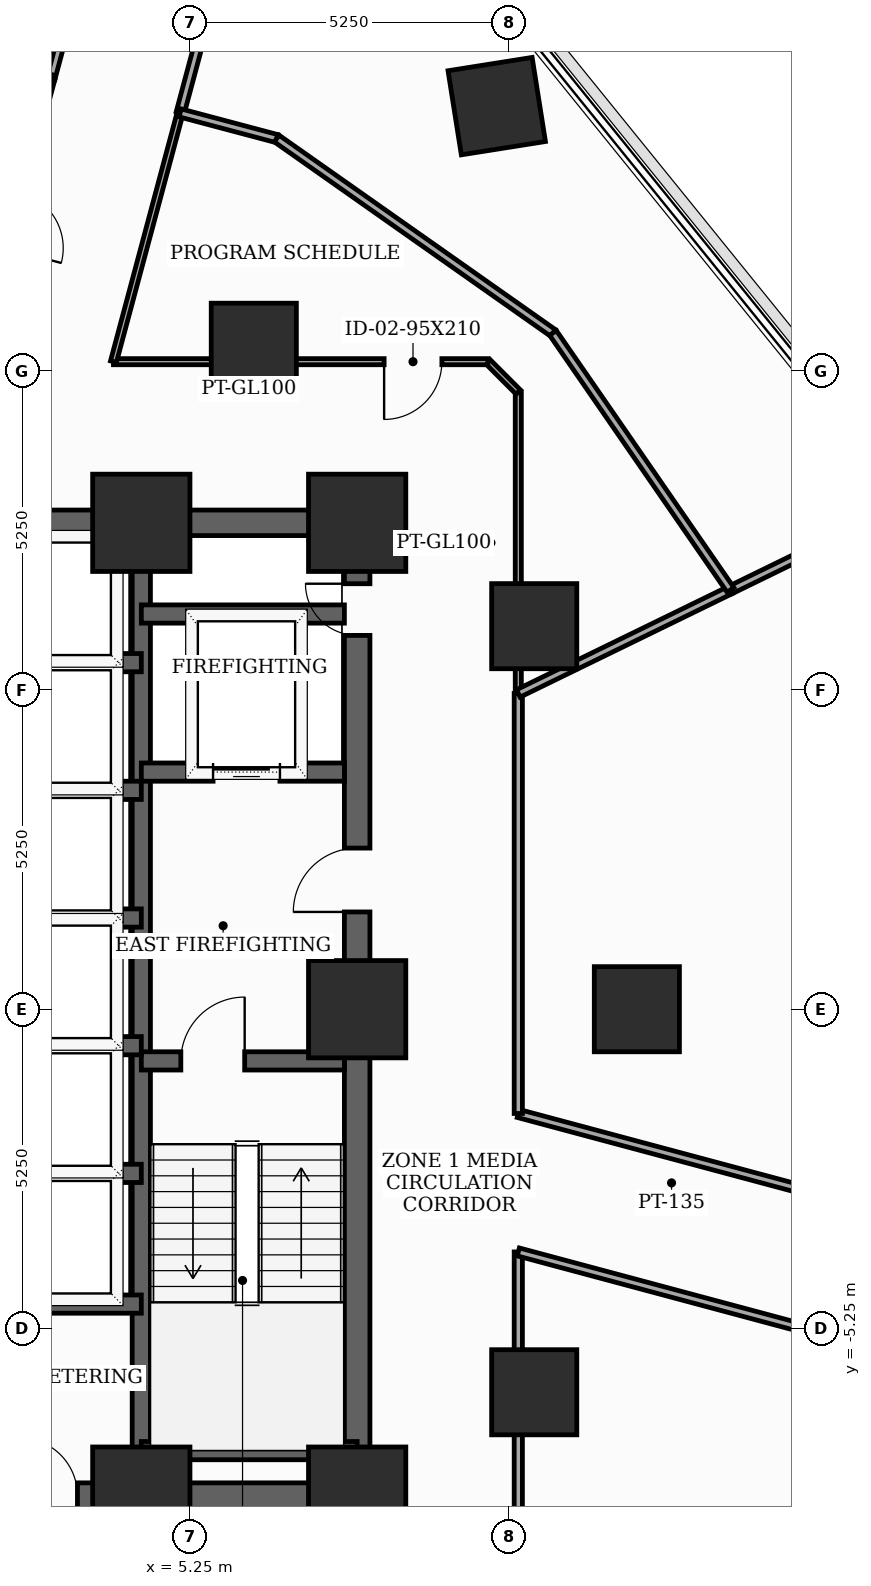
"""IFC4 building model, lengths in metres.
Left out: names, types, materials, properties, quantities, classifications, styles, units other than length and angle.
Written with IfcOpenShell. Run it as: python <this file> out.ifc"""

import sys

from ifc_helpers import new_model, si_unit, direction, frame, frame_2d, origin, origin_2d, place, context, subcontext, project, spatial, rectangle, extrude, element, fill, save


model = new_model("IFC4")
c1 = context("Model", 3, precision=1e-05, world=origin(), true_north=direction((0.0, 1.0)))
c2 = subcontext(c1, "Body", "Model", "MODEL_VIEW")
j1 = project(units=[si_unit("LENGTHUNIT", "METRE"), si_unit("PLANEANGLEUNIT", "RADIAN")], contexts=[c1])
p1 = place(None, origin())
s1 = spatial("IfcSite", under=j1, at=p1, CompositionType="ELEMENT")
p2 = place(p1, origin())
s2 = spatial("IfcBuilding", under=s1, at=p2, CompositionType="ELEMENT")
p3 = place(p2, frame((0.0, 0.0, 70.4)))
s3 = spatial("IfcBuildingStorey", under=s2, at=p3, CompositionType="ELEMENT", Elevation=70.4)
for number, where, z_axis, x_axis in (
    (1, (4.45, -8.0, 0.0), (0.0, 0.0, 1.0), (1.0, 0.0, 0.0)),
    (2, (8.0, -8.0, 0.0), (0.0, 0.0, 1.0), (1.0, 0.0, 0.0)),
    (3, (8.0, 0.0, 0.0), (0.0, 0.0, 1.0), (1.0, 0.0, 0.0)),
    (4, (8.0, 8.0, 0.0), (0.0, 0.0, 1.0), (1.0, 0.0, 0.0)),
    (5, (4.45, 8.0, 0.0), (0.0, 0.0, 1.0), (1.0, 0.0, 0.0)),
):
    element("IfcColumn", number, at=place(p3, frame(where, z_axis=z_axis, x_axis=x_axis)), inside=s3, PredefinedType="COLUMN", context=c2, shape_type="SweptSolid", body=[
        extrude(rectangle(XDim=1.6, YDim=1.6, at=origin_2d()), origin(), (0.0, 0.0, 1.0), 3.7),
    ])
for number, where, z_axis, x_axis in (
    (6, (12.6, 0.0, 0.0), (0.0, 0.0, 1.0), (1.0, 0.0, 0.0)),
    (7, (10.912, 6.3, 0.0), (0.0, 0.0, 1.0), (1.0, 0.0, 0.0)),
    (8, (6.3, 10.912, 0.0), (0.0, 0.0, 1.0), (1.0, 0.0, 0.0)),
    (9, (10.912, -6.3, 0.0), (0.0, 0.0, 1.0), (1.0, 0.0, 0.0)),
    (10, (10.295, 14.853, 0.0), (0.0, 0.0, 1.0), (0.988, 0.156, 0.0)),
):
    element("IfcColumn", number, at=place(p3, frame(where, z_axis=z_axis, x_axis=x_axis)), inside=s3, PredefinedType="COLUMN", context=c2, shape_type="SweptSolid", body=[
        extrude(rectangle(XDim=1.4, YDim=1.4, at=origin_2d()), origin(), (0.0, 0.0, 1.0), 3.7),
    ])
p4 = place(p3, frame((8.0, -8.0, 0.0), z_axis=(0.0, 0.0, 1.0), x_axis=(0.0, 1.0, 0.0)))
e11 = element("IfcWall", 11, at=p4, inside=s3, PredefinedType="SHEAR", context=c2, shape_type="SweptSolid", body=[
    extrude(rectangle(XDim=16.0, YDim=0.42, at=frame_2d((8.0, 0.0))), origin(), (0.0, 0.0, 1.0), 3.5),
])
p5 = place(p4, frame((9.6, 0.0, 0.0)))
e12 = element("IfcOpeningElement", 12, at=p5, cuts=e11, PredefinedType="OPENING", context=c2, shape_type="SweptSolid", body=[
    extrude(rectangle(XDim=1.05, YDim=2.15, at=frame_2d((0.525, 1.075))), frame((0.0, 0.22, 0.0), z_axis=(0.0, -1.0, 0.0), x_axis=(1.0, 0.0, 0.0)), (0.0, 0.0, 1.0), 0.44),
])
p6 = place(p4, frame((14.148, 0.0, 0.0)))
e13 = element("IfcOpeningElement", 13, at=p6, cuts=e11, PredefinedType="OPENING", context=c2, shape_type="SweptSolid", body=[
    extrude(rectangle(XDim=0.85, YDim=2.02, at=frame_2d((0.425, 1.01))), frame((0.0, 0.22, 0.0), z_axis=(0.0, -1.0, 0.0), x_axis=(1.0, 0.0, 0.0)), (0.0, 0.0, 1.0), 0.44),
])
p7 = place(p3, frame((-8.0, -8.0, 0.0), z_axis=(0.0, 0.0, 1.0), x_axis=(1.0, 0.0, 0.0)))
e14 = element("IfcWall", 14, at=p7, inside=s3, PredefinedType="SHEAR", context=c2, shape_type="SweptSolid", body=[
    extrude(rectangle(XDim=16.0, YDim=0.42, at=frame_2d((8.0, 0.0))), origin(), (0.0, 0.0, 1.0), 3.5),
])
p8 = place(p7, frame((4.6, 0.0, 0.0)))
e15 = element("IfcOpeningElement", 15, at=p8, cuts=e14, PredefinedType="OPENING", context=c2, shape_type="SweptSolid", body=[
    extrude(rectangle(XDim=0.95, YDim=2.1, at=frame_2d((0.475, 1.05))), frame((0.0, 0.22, 0.0), z_axis=(0.0, -1.0, 0.0), x_axis=(1.0, 0.0, 0.0)), (0.0, 0.0, 1.0), 0.44),
])
p9 = place(p7, frame((7.52, 0.0, 0.0)))
e16 = element("IfcOpeningElement", 16, at=p9, cuts=e14, PredefinedType="OPENING", context=c2, shape_type="SweptSolid", body=[
    extrude(rectangle(XDim=0.95, YDim=2.1, at=frame_2d((0.475, 1.05))), frame((0.0, 0.22, 0.0), z_axis=(0.0, -1.0, 0.0), x_axis=(1.0, 0.0, 0.0)), (0.0, 0.0, 1.0), 0.44),
])
p10 = place(p7, frame((10.45, 0.0, 0.0)))
e17 = element("IfcOpeningElement", 17, at=p10, cuts=e14, PredefinedType="OPENING", context=c2, shape_type="SweptSolid", body=[
    extrude(rectangle(XDim=0.95, YDim=2.1, at=frame_2d((0.475, 1.05))), frame((0.0, 0.22, 0.0), z_axis=(0.0, -1.0, 0.0), x_axis=(1.0, 0.0, 0.0)), (0.0, 0.0, 1.0), 0.44),
])
p11 = place(p3, frame((-8.0, 8.0, 0.0), z_axis=(0.0, 0.0, 1.0), x_axis=(1.0, 0.0, 0.0)))
e18 = element("IfcWall", 18, at=p11, inside=s3, PredefinedType="SHEAR", context=c2, shape_type="SweptSolid", body=[
    extrude(rectangle(XDim=16.0, YDim=0.42, at=frame_2d((8.0, 0.0))), origin(), (0.0, 0.0, 1.0), 3.5),
])
p12 = place(p11, frame((7.1, 0.0, 0.0)))
e19 = element("IfcOpeningElement", 19, at=p12, cuts=e18, PredefinedType="OPENING", context=c2, shape_type="SweptSolid", body=[
    extrude(rectangle(XDim=1.8, YDim=2.15, at=frame_2d((0.9, 1.075))), frame((0.0, 0.22, 0.0), z_axis=(0.0, -1.0, 0.0), x_axis=(1.0, 0.0, 0.0)), (0.0, 0.0, 1.0), 0.44),
])
p13 = place(p3, frame((4.45, -7.79, 0.0), z_axis=(0.0, 0.0, 1.0), x_axis=(0.0, 1.0, 0.0)))
e20 = element("IfcWall", 20, at=p13, inside=s3, PredefinedType="SHEAR", context=c2, shape_type="SweptSolid", body=[
    extrude(rectangle(XDim=15.58, YDim=0.3, at=frame_2d((7.79, 0.0))), origin(), (0.0, 0.0, 1.0), 3.5),
])
p14 = place(p3, frame((4.45, -0.85, 0.0), z_axis=(0.0, 0.0, 1.0), x_axis=(1.0, 0.0, 0.0)))
e21 = element("IfcWall", 21, at=p14, inside=s3, PredefinedType="SHEAR", context=c2, shape_type="SweptSolid", body=[
    extrude(rectangle(XDim=3.34, YDim=0.3, at=frame_2d((1.67, 0.0))), origin(), (0.0, 0.0, 1.0), 3.5),
])
p15 = place(p14, frame((0.65, 0.0, 0.0)))
e22 = element("IfcOpeningElement", 22, at=p15, cuts=e21, PredefinedType="OPENING", context=c2, shape_type="SweptSolid", body=[
    extrude(rectangle(XDim=1.05, YDim=2.15, at=frame_2d((0.525, 1.075))), frame((0.0, 0.16, 0.0), z_axis=(0.0, -1.0, 0.0), x_axis=(1.0, 0.0, 0.0)), (0.0, 0.0, 1.0), 0.32),
])
p16 = place(p3, frame((4.45, -7.26, 0.0), z_axis=(0.0, 0.0, 1.0), x_axis=(1.0, 0.0, 0.0)))
e23 = element("IfcWall", 23, at=p16, inside=s3, PredefinedType="SHEAR", context=c2, shape_type="SweptSolid", body=[
    extrude(rectangle(XDim=3.55, YDim=0.3, at=frame_2d((1.775, 0.0))), origin(), (0.0, 0.0, 1.0), 3.5),
])
p17 = place(p3, frame((4.45, 3.9, 0.0), z_axis=(0.0, 0.0, 1.0), x_axis=(1.0, 0.0, 0.0)))
e24 = element("IfcWall", 24, at=p17, inside=s3, PredefinedType="SHEAR", context=c2, shape_type="SweptSolid", body=[
    extrude(rectangle(XDim=3.34, YDim=0.3, at=frame_2d((1.67, 0.0))), origin(), (0.0, 0.0, 1.0), 3.5),
])
p18 = place(p17, frame((1.18, 0.0, 0.0)))
e25 = element("IfcOpeningElement", 25, at=p18, cuts=e24, PredefinedType="OPENING", context=c2, shape_type="SweptSolid", body=[
    extrude(rectangle(XDim=1.1, YDim=2.1, at=frame_2d((0.55, 1.05))), frame((0.0, 0.16, 0.0), z_axis=(0.0, -1.0, 0.0), x_axis=(1.0, 0.0, 0.0)), (0.0, 0.0, 1.0), 0.32),
])
p19 = place(p3, frame((4.45, 6.5, 0.0), z_axis=(0.0, 0.0, 1.0), x_axis=(1.0, 0.0, 0.0)))
e26 = element("IfcWall", 26, at=p19, inside=s3, PredefinedType="SHEAR", context=c2, shape_type="SweptSolid", body=[
    extrude(rectangle(XDim=3.34, YDim=0.3, at=frame_2d((1.67, 0.0))), origin(), (0.0, 0.0, 1.0), 3.5),
])
p20 = place(p3, frame((-4.45, -4.85, 0.0), z_axis=(0.0, 0.0, 1.0), x_axis=(1.0, 0.0, 0.0)))
e27 = element("IfcWall", 27, at=p20, inside=s3, PredefinedType="SHEAR", context=c2, shape_type="SweptSolid", body=[
    extrude(rectangle(XDim=8.9, YDim=0.3, at=frame_2d((4.45, 0.0))), origin(), (0.0, 0.0, 1.0), 3.5),
])
for number, where, z_axis, x_axis in (
    (28, (1.68, 1.5, 0.0), (0.0, 0.0, 1.0), (1.0, 0.0, 0.0)),
    (29, (1.68, 3.6, 0.0), (0.0, 0.0, 1.0), (1.0, 0.0, 0.0)),
    (30, (1.68, 5.7, 0.0), (0.0, 0.0, 1.0), (1.0, 0.0, 0.0)),
    (31, (1.68, -2.7, 0.0), (0.0, 0.0, 1.0), (1.0, 0.0, 0.0)),
    (32, (1.68, -0.6, 0.0), (0.0, 0.0, 1.0), (1.0, 0.0, 0.0)),
):
    element("IfcWall", number, at=place(p3, frame(where, z_axis=z_axis, x_axis=x_axis)), inside=s3, PredefinedType="SHEAR", context=c2, shape_type="SweptSolid", body=[
        extrude(rectangle(XDim=2.77, YDim=0.3, at=frame_2d((1.385, 0.0))), origin(), (0.0, 0.0, 1.0), 3.5),
    ])
p21 = place(p3, frame((10.65, -10.15, 0.0), z_axis=(0.0, 0.0, 1.0), x_axis=(0.0, 1.0, 0.0)))
e33 = element("IfcWall", 33, at=p21, inside=s3, PredefinedType="PARTITIONING", context=c2, shape_type="SweptSolid", body=[
    extrude(rectangle(XDim=6.158, YDim=0.135, at=frame_2d((3.079, 0.0))), origin(), (0.0, 0.0, 1.0), 2.785),
])
p22 = place(p3, frame((10.65, -3.992, 0.0), z_axis=(0.0, 0.0, 1.0), x_axis=(0.965906888357, -0.258889712088, 0.0)))
e34 = element("IfcWall", 34, at=p22, inside=s3, PredefinedType="PARTITIONING", context=c2, shape_type="SweptSolid", body=[
    extrude(rectangle(XDim=11.28, YDim=0.135, at=frame_2d((5.64, 0.0))), origin(), (0.0, 0.0, 1.0), 2.785),
])
p23 = place(p3, frame((22.115, -4.787, 0.0), z_axis=(0.0, 0.0, 1.0), x_axis=(-0.965926659449, 0.258815935688, 0.0)))
e35 = element("IfcWall", 35, at=p23, inside=s3, PredefinedType="PARTITIONING", context=c2, shape_type="SweptSolid", body=[
    extrude(rectangle(XDim=11.87, YDim=0.135, at=frame_2d((5.935, 0.0))), origin(), (0.0, 0.0, 1.0), 2.785),
])
p24 = place(p23, frame((5.46, 0.0, 0.0)))
e36 = element("IfcOpeningElement", 36, at=p24, cuts=e35, PredefinedType="OPENING", context=c2, shape_type="SweptSolid", body=[
    extrude(rectangle(XDim=0.95, YDim=2.1, at=frame_2d((0.475, 1.05))), frame((0.0, 0.077, 0.0), z_axis=(0.0, -1.0, 0.0), x_axis=(1.0, 0.0, 0.0)), (0.0, 0.0, 1.0), 0.155),
])
p25 = place(p3, frame((10.65, -1.715, 0.0), z_axis=(0.0, 0.0, 1.0), x_axis=(0.0, 1.0, 0.0)))
e37 = element("IfcWall", 37, at=p25, inside=s3, PredefinedType="PARTITIONING", context=c2, shape_type="SweptSolid", body=[
    extrude(rectangle(XDim=6.909, YDim=0.135, at=frame_2d((3.455, 0.0))), origin(), (0.0, 0.0, 1.0), 2.785),
])
p26 = place(p3, frame((2.963, 15.306, 0.0), z_axis=(0.0, 0.0, 1.0), x_axis=(-0.25886350996, -0.965913910869, 0.0)))
e38 = element("IfcWall", 38, at=p26, inside=s3, PredefinedType="PARTITIONING", context=c2, shape_type="SweptSolid", body=[
    extrude(rectangle(XDim=4.82, YDim=0.135, at=frame_2d((2.41, 0.0))), origin(), (0.0, 0.0, 1.0), 2.785),
])
p27 = place(p26, frame((1.935, 0.0, 0.0)))
e39 = element("IfcOpeningElement", 39, at=p27, cuts=e38, PredefinedType="OPENING", context=c2, shape_type="SweptSolid", body=[
    extrude(rectangle(XDim=0.95, YDim=2.1, at=frame_2d((0.475, 1.05))), frame((0.0, 0.077, 0.0), z_axis=(0.0, -1.0, 0.0), x_axis=(1.0, 0.0, 0.0)), (0.0, 0.0, 1.0), 0.155),
])
p28 = place(p3, frame((5.089, 14.742, 0.0), z_axis=(0.0, 0.0, 1.0), x_axis=(0.258768350918, 0.965939408329, 0.0)))
e40 = element("IfcWall", 40, at=p28, inside=s3, PredefinedType="PARTITIONING", context=c2, shape_type="SweptSolid", body=[
    extrude(rectangle(XDim=5.043, YDim=0.135, at=frame_2d((2.521, 0.0))), origin(), (0.0, 0.0, 1.0), 2.935),
])
p29 = place(p3, frame((4.269, 20.183, 0.0), z_axis=(0.0, 0.0, 1.0), x_axis=(-0.258691774004, -0.965959919491, 0.0)))
e41 = element("IfcWall", 41, at=p29, inside=s3, PredefinedType="PARTITIONING", context=c2, shape_type="SweptSolid", body=[
    extrude(rectangle(XDim=5.049, YDim=0.135, at=frame_2d((2.524, 0.0))), origin(), (0.0, 0.0, 1.0), 3.085),
])
p30 = place(p29, frame((2.049, 0.0, 0.0)))
e42 = element("IfcOpeningElement", 42, at=p30, cuts=e41, PredefinedType="OPENING", context=c2, shape_type="SweptSolid", body=[
    extrude(rectangle(XDim=0.95, YDim=2.1, at=frame_2d((0.475, 1.05))), frame((0.0, 0.077, 0.0), z_axis=(0.0, -1.0, 0.0), x_axis=(1.0, 0.0, 0.0)), (0.0, 0.0, 1.0), 0.155),
])
p31 = place(p3, frame((10.65, 5.194, 0.0), z_axis=(0.0, 0.0, 1.0), x_axis=(0.0, 1.0, 0.0)))
e43 = element("IfcWall", 43, at=p31, inside=s3, PredefinedType="MOVABLE", context=c2, shape_type="SweptSolid", body=[
    extrude(rectangle(XDim=4.956, YDim=0.1, at=frame_2d((2.478, 0.0))), origin(), (0.0, 0.0, 1.0), 2.785),
])
p32 = place(p3, frame((10.65, 10.15, 0.0), z_axis=(0.0, 0.0, 1.0), x_axis=(-0.707106781187, 0.707106781187, 0.0)))
e44 = element("IfcWall", 44, at=p32, inside=s3, PredefinedType="MOVABLE", context=c2, shape_type="SweptSolid", body=[
    extrude(rectangle(XDim=0.707, YDim=0.1, at=frame_2d((0.354, 0.0))), origin(), (0.0, 0.0, 1.0), 3.5),
])
p33 = place(p3, frame((10.15, 10.65, 0.0), z_axis=(0.0, 0.0, 1.0), x_axis=(-1.0, 0.0, 0.0)))
e45 = element("IfcWall", 45, at=p33, inside=s3, PredefinedType="MOVABLE", context=c2, shape_type="SweptSolid", body=[
    extrude(rectangle(XDim=6.158, YDim=0.1, at=frame_2d((3.079, 0.0))), origin(), (0.0, 0.0, 1.0), 2.785),
])
p34 = place(p33, frame((0.757, 0.0, 0.0)))
e46 = element("IfcOpeningElement", 46, at=p34, cuts=e45, PredefinedType="OPENING", context=c2, shape_type="SweptSolid", body=[
    extrude(rectangle(XDim=0.95, YDim=2.1, at=frame_2d((0.475, 1.05))), frame((0.0, 0.06, 0.0), z_axis=(0.0, -1.0, 0.0), x_axis=(1.0, 0.0, 0.0)), (0.0, 0.0, 1.0), 0.12),
])
p35 = place(p3, frame((3.992, 10.65, 0.0), z_axis=(0.0, 0.0, 1.0), x_axis=(0.258975157658, 0.965883982534, 0.0)))
e47 = element("IfcWall", 47, at=p35, inside=s3, PredefinedType="MOVABLE", context=c2, shape_type="SweptSolid", body=[
    extrude(rectangle(XDim=4.237, YDim=0.1, at=frame_2d((2.118, 0.0))), origin(), (0.0, 0.0, 1.0), 2.785),
])
p36 = place(p3, frame((17.082, 8.332, 0.0), z_axis=(0.0, 0.0, 1.0), x_axis=(-0.898652301999, -0.438661646503, 0.0)))
e48 = element("IfcWall", 48, at=p36, inside=s3, PredefinedType="PARTITIONING", context=c2, shape_type="SweptSolid", body=[
    extrude(rectangle(XDim=3.274, YDim=0.135, at=frame_2d((1.637, 0.0))), origin(), (0.0, 0.0, 1.0), 2.785),
])
p37 = place(p3, frame((14.14, 6.896, 0.0), z_axis=(0.0, 0.0, 1.0), x_axis=(-0.898822220958, -0.438313375467, 0.0)))
e49 = element("IfcWall", 49, at=p37, inside=s3, PredefinedType="PARTITIONING", context=c2, shape_type="SweptSolid", body=[
    extrude(rectangle(XDim=3.883, YDim=0.135, at=frame_2d((1.941, 0.0))), origin(), (0.0, 0.0, 1.0), 2.785),
])
p38 = place(p3, frame((5.089, 14.742, 0.0), z_axis=(0.0, 0.0, 1.0), x_axis=(0.966471299447, -0.256774662584, 0.0)))
e50 = element("IfcWall", 50, at=p38, inside=s3, PredefinedType="PARTITIONING", context=c2, shape_type="SweptSolid", body=[
    extrude(rectangle(XDim=1.643, YDim=0.135, at=frame_2d((0.822, 0.0))), origin(), (0.0, 0.0, 1.0), 3.085),
])
p39 = place(p3, frame((6.677, 14.32, 0.0), z_axis=(0.0, 0.0, 1.0), x_axis=(0.817854672362, -0.575424829926, 0.0)))
e51 = element("IfcWall", 51, at=p39, inside=s3, PredefinedType="PARTITIONING", context=c2, shape_type="SweptSolid", body=[
    extrude(rectangle(XDim=5.556, YDim=0.135, at=frame_2d((2.778, 0.0))), origin(), (0.0, 0.0, 1.0), 2.785),
])
p40 = place(p3, frame((11.221, 11.123, 0.0), z_axis=(0.0, 0.0, 1.0), x_axis=(0.568225964568, -0.822872561938, 0.0)))
e52 = element("IfcWall", 52, at=p40, inside=s3, PredefinedType="PARTITIONING", context=c2, shape_type="SweptSolid", body=[
    extrude(rectangle(XDim=5.137, YDim=0.135, at=frame_2d((2.568, 0.0))), origin(), (0.0, 0.0, 1.0), 2.785),
])
p41 = place(p5, origin())
e53 = element("IfcDoor", 53, at=p41, inside=s3, OperationType="SINGLE_SWING_LEFT", PredefinedType="DOOR", context=c2, shape_type="SweptSolid", body=[
    extrude(rectangle(XDim=1.05, YDim=2.15, at=frame_2d((0.525, 1.075))), frame((0.0, 0.025, 0.0), z_axis=(0.0, -1.0, 0.0), x_axis=(1.0, 0.0, 0.0)), (0.0, 0.0, 1.0), 0.05),
])
fill(e12, e53)
p42 = place(p6, origin())
e54 = element("IfcDoor", 54, at=p42, inside=s3, OperationType="SINGLE_SWING_RIGHT", PredefinedType="TRAPDOOR", context=c2, shape_type="SweptSolid", body=[
    extrude(rectangle(XDim=0.85, YDim=2.02, at=frame_2d((0.425, 1.01))), frame((0.0, 0.025, 0.0), z_axis=(0.0, -1.0, 0.0), x_axis=(1.0, 0.0, 0.0)), (0.0, 0.0, 1.0), 0.05),
])
fill(e13, e54)
p43 = place(p10, origin())
e55 = element("IfcDoor", 55, at=p43, inside=s3, OperationType="SINGLE_SWING_LEFT", PredefinedType="DOOR", context=c2, shape_type="SweptSolid", body=[
    extrude(rectangle(XDim=0.95, YDim=2.1, at=frame_2d((0.475, 1.05))), frame((0.0, 0.025, 0.0), z_axis=(0.0, -1.0, 0.0), x_axis=(1.0, 0.0, 0.0)), (0.0, 0.0, 1.0), 0.05),
])
fill(e17, e55)
p44 = place(p15, origin())
e56 = element("IfcDoor", 56, at=p44, inside=s3, OperationType="SINGLE_SWING_RIGHT", PredefinedType="DOOR", context=c2, shape_type="SweptSolid", body=[
    extrude(rectangle(XDim=1.05, YDim=2.15, at=frame_2d((0.525, 1.075))), frame((0.0, 0.025, 0.0), z_axis=(0.0, -1.0, 0.0), x_axis=(1.0, 0.0, 0.0)), (0.0, 0.0, 1.0), 0.05),
])
fill(e22, e56)
p45 = place(p18, origin())
e57 = element("IfcDoor", 57, at=p45, inside=s3, OperationType="SLIDING_TO_LEFT", PredefinedType="DOOR", context=c2, shape_type="SweptSolid", body=[
    extrude(rectangle(XDim=1.1, YDim=2.1, at=frame_2d((0.55, 1.05))), frame((0.0, 0.025, 0.0), z_axis=(0.0, -1.0, 0.0), x_axis=(1.0, 0.0, 0.0)), (0.0, 0.0, 1.0), 0.05),
])
fill(e25, e57)
p46 = place(p34, origin())
e58 = element("IfcDoor", 58, at=p46, inside=s3, OperationType="SINGLE_SWING_RIGHT", PredefinedType="DOOR", context=c2, shape_type="SweptSolid", body=[
    extrude(rectangle(XDim=0.95, YDim=2.1, at=frame_2d((0.475, 1.05))), frame((0.0, 0.025, 0.0), z_axis=(0.0, -1.0, 0.0), x_axis=(1.0, 0.0, 0.0)), (0.0, 0.0, 1.0), 0.05),
])
fill(e46, e58)
save(model, sys.argv[1])
